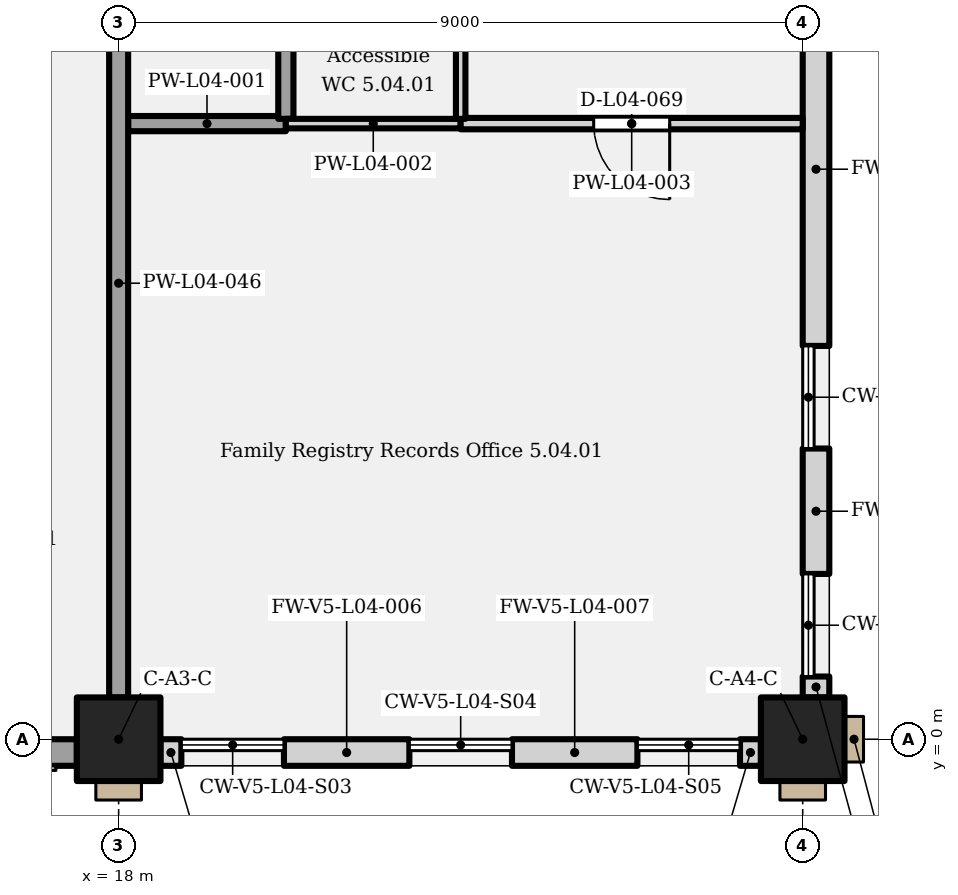
"""IFC4 building model, lengths in metres.
Left out: names, types, materials, properties, quantities, classifications, styles, units other than length and angle.
Written with IfcOpenShell. Run it as: python <this file> out.ifc"""

import sys

from ifc_helpers import new_model, si_unit, direction, frame, frame_2d, origin, origin_2d, place, context, subcontext, project, spatial, rectangle, extrude, element, fill, save


model = new_model("IFC4")
c1 = context("Model", 3, precision=1e-05, world=origin(), true_north=direction((0.0, 1.0)))
c2 = subcontext(c1, "Body", "Model", "MODEL_VIEW")
j1 = project(units=[si_unit("LENGTHUNIT", "METRE"), si_unit("PLANEANGLEUNIT", "RADIAN")], contexts=[c1])
p1 = place(None, origin())
s1 = spatial("IfcSite", under=j1, at=p1, CompositionType="ELEMENT")
p2 = place(p1, origin())
s2 = spatial("IfcBuilding", under=s1, at=p2, CompositionType="ELEMENT")
p3 = place(p2, frame((0.0, 0.0, 22.8)))
s3 = spatial("IfcBuildingStorey", under=s2, at=p3, CompositionType="ELEMENT", Elevation=22.8)
for number, where, z_axis, x_axis in (
    (1, (18.0, 0.0, 0.0), (0.0, 0.0, 1.0), (1.0, 0.0, 0.0)),
    (2, (27.0, 0.0, 0.0), (0.0, 0.0, 1.0), (1.0, 0.0, 0.0)),
):
    element("IfcColumn", number, at=place(p3, frame(where, z_axis=z_axis, x_axis=x_axis)), inside=s3, PredefinedType="COLUMN", context=c2, shape_type="SweptSolid", body=[
        extrude(rectangle(XDim=1.1, YDim=1.1, at=origin_2d()), origin(), (0.0, 0.0, 1.0), 5.4),
    ])
p4 = place(p3, frame((9.55, -0.175, 0.0), z_axis=(0.0, 0.0, 1.0), x_axis=(1.0, 0.0, 0.0)))
e3 = element("IfcWall", 3, at=p4, inside=s3, PredefinedType="SOLIDWALL", context=c2, shape_type="SweptSolid", body=[
    extrude(rectangle(XDim=7.9, YDim=0.35, at=frame_2d((3.95, 0.0))), origin(), (0.0, 0.0, 1.0), 5.15),
])
p5 = place(p3, frame((18.55, -0.175, 0.0), z_axis=(0.0, 0.0, 1.0), x_axis=(1.0, 0.0, 0.0)))
e4 = element("IfcWall", 4, at=p5, inside=s3, PredefinedType="SOLIDWALL", context=c2, shape_type="SweptSolid", body=[
    extrude(rectangle(XDim=0.275, YDim=0.35, at=frame_2d((0.137, 0.0))), origin(), (0.0, 0.0, 1.0), 5.15),
])
for number, where, z_axis, x_axis in (
    (5, (20.175, -0.175, 0.0), (0.0, 0.0, 1.0), (1.0, 0.0, 0.0)),
    (6, (23.175, -0.175, 0.0), (0.0, 0.0, 1.0), (1.0, 0.0, 0.0)),
):
    element("IfcWall", number, at=place(p3, frame(where, z_axis=z_axis, x_axis=x_axis)), inside=s3, PredefinedType="SOLIDWALL", context=c2, shape_type="SweptSolid", body=[
        extrude(rectangle(XDim=1.65, YDim=0.35, at=frame_2d((0.825, 0.0))), origin(), (0.0, 0.0, 1.0), 5.15),
    ])
for number, where, z_axis, x_axis in (
    (7, (26.175, -0.175, 0.0), (0.0, 0.0, 1.0), (1.0, 0.0, 0.0)),
    (8, (27.175, 0.55, 0.0), (0.0, 0.0, 1.0), (0.0, 1.0, 0.0)),
):
    element("IfcWall", number, at=place(p3, frame(where, z_axis=z_axis, x_axis=x_axis)), inside=s3, PredefinedType="SOLIDWALL", context=c2, shape_type="SweptSolid", body=[
        extrude(rectangle(XDim=0.275, YDim=0.35, at=frame_2d((0.137, 0.0))), origin(), (0.0, 0.0, 1.0), 5.15),
    ])
p6 = place(p3, frame((27.175, 2.175, 0.0), z_axis=(0.0, 0.0, 1.0), x_axis=(0.0, 1.0, 0.0)))
e9 = element("IfcWall", 9, at=p6, inside=s3, PredefinedType="SOLIDWALL", context=c2, shape_type="SweptSolid", body=[
    extrude(rectangle(XDim=1.65, YDim=0.35, at=frame_2d((0.825, 0.0))), origin(), (0.0, 0.0, 1.0), 5.15),
])
p7 = place(p3, frame((27.175, 5.175, 0.0), z_axis=(0.0, 0.0, 1.0), x_axis=(0.0, 1.0, 0.0)))
e10 = element("IfcWall", 10, at=p7, inside=s3, PredefinedType="SOLIDWALL", context=c2, shape_type="SweptSolid", body=[
    extrude(rectangle(XDim=4.65, YDim=0.35, at=frame_2d((2.325, 0.0))), origin(), (0.0, 0.0, 1.0), 5.15),
])
p8 = place(p3, frame((18.125, 8.1, 0.0), z_axis=(0.0, 0.0, 1.0), x_axis=(1.0, 0.0, 0.0)))
e11 = element("IfcWall", 11, at=p8, inside=s3, PredefinedType="PARTITIONING", context=c2, shape_type="SweptSolid", body=[
    extrude(rectangle(XDim=2.075, YDim=0.2, at=frame_2d((1.038, 0.0))), origin(), (0.0, 0.0, 1.0), 5.15),
])
p9 = place(p3, frame((20.2, 8.1, 0.0), z_axis=(0.0, 0.0, 1.0), x_axis=(1.0, 0.0, 0.0)))
e12 = element("IfcWall", 12, at=p9, inside=s3, PredefinedType="PARTITIONING", context=c2, shape_type="SweptSolid", body=[
    extrude(rectangle(XDim=2.3, YDim=0.125, at=frame_2d((1.15, 0.0))), origin(), (0.0, 0.0, 1.0), 5.15),
])
p10 = place(p3, frame((22.5, 8.1, 0.0), z_axis=(0.0, 0.0, 1.0), x_axis=(1.0, 0.0, 0.0)))
e13 = element("IfcWall", 13, at=p10, inside=s3, PredefinedType="PARTITIONING", context=c2, shape_type="SweptSolid", body=[
    extrude(rectangle(XDim=4.5, YDim=0.15, at=frame_2d((2.25, 0.0))), origin(), (0.0, 0.0, 1.0), 5.15),
])
p11 = place(p10, frame((2.75, 0.0, 0.0), z_axis=(0.0, 0.0, 1.0), x_axis=(-1.0, 0.0, 0.0)))
e14 = element("IfcOpeningElement", 14, at=p11, cuts=e13, PredefinedType="OPENING", context=c2, shape_type="SweptSolid", body=[
    extrude(rectangle(XDim=1.0, YDim=2.1, at=frame_2d((0.5, 1.05))), frame((0.0, 0.085, 0.0), z_axis=(0.0, -1.0, 0.0), x_axis=(1.0, 0.0, 0.0)), (0.0, 0.0, 1.0), 0.17),
])
p12 = place(p3, frame((18.0, 0.55, 0.0), z_axis=(0.0, 0.0, 1.0), x_axis=(0.0, 1.0, 0.0)))
e15 = element("IfcWall", 15, at=p12, inside=s3, PredefinedType="PARTITIONING", context=c2, shape_type="SweptSolid", body=[
    extrude(rectangle(XDim=10.9, YDim=0.25, at=frame_2d((5.45, 0.0))), origin(), (0.0, 0.0, 1.0), 4.4),
])
p13 = place(p3, frame((20.2, 8.163, 0.0), z_axis=(0.0, 0.0, 1.0), x_axis=(0.0, 1.0, 0.0)))
e16 = element("IfcWall", 16, at=p13, inside=s3, PredefinedType="PARTITIONING", context=c2, shape_type="SweptSolid", body=[
    extrude(rectangle(XDim=8.837, YDim=0.2, at=frame_2d((4.419, 0.0))), origin(), (0.0, 0.0, 1.0), 5.15),
])
p14 = place(p13, frame((8.037, 0.0, 0.0), z_axis=(0.0, 0.0, 1.0), x_axis=(-1.0, 0.0, 0.0)))
e17 = element("IfcOpeningElement", 17, at=p14, cuts=e16, PredefinedType="OPENING", context=c2, shape_type="SweptSolid", body=[
    extrude(rectangle(XDim=0.9, YDim=2.1, at=frame_2d((0.45, 1.05))), frame((0.0, 0.11, 0.0), z_axis=(0.0, -1.0, 0.0), x_axis=(1.0, 0.0, 0.0)), (0.0, 0.0, 1.0), 0.22),
])
p15 = place(p13, frame((5.337, 0.0, 0.0), z_axis=(0.0, 0.0, 1.0), x_axis=(-1.0, 0.0, 0.0)))
e18 = element("IfcOpeningElement", 18, at=p15, cuts=e16, PredefinedType="OPENING", context=c2, shape_type="SweptSolid", body=[
    extrude(rectangle(XDim=0.9, YDim=2.1, at=frame_2d((0.45, 1.05))), frame((0.0, 0.11, 0.0), z_axis=(0.0, -1.0, 0.0), x_axis=(1.0, 0.0, 0.0)), (0.0, 0.0, 1.0), 0.22),
])
p16 = place(p13, frame((2.238, 0.0, 0.0), z_axis=(0.0, 0.0, 1.0), x_axis=(-1.0, 0.0, 0.0)))
e19 = element("IfcOpeningElement", 19, at=p16, cuts=e16, PredefinedType="OPENING", context=c2, shape_type="SweptSolid", body=[
    extrude(rectangle(XDim=1.0, YDim=2.1, at=frame_2d((0.5, 1.05))), frame((0.0, 0.11, 0.0), z_axis=(0.0, -1.0, 0.0), x_axis=(1.0, 0.0, 0.0)), (0.0, 0.0, 1.0), 0.22),
])
p17 = place(p3, frame((22.5, 8.163, 0.0), z_axis=(0.0, 0.0, 1.0), x_axis=(0.0, 1.0, 0.0)))
e20 = element("IfcWall", 20, at=p17, inside=s3, PredefinedType="PARTITIONING", context=c2, shape_type="SweptSolid", body=[
    extrude(rectangle(XDim=8.837, YDim=0.125, at=frame_2d((4.419, 0.0))), origin(), (0.0, 0.0, 1.0), 5.15),
])
p18 = place(p11, origin())
e21 = element("IfcDoor", 21, at=p18, inside=s3, OperationType="SINGLE_SWING_LEFT", PredefinedType="DOOR", context=c2, shape_type="SweptSolid", body=[
    extrude(rectangle(XDim=1.0, YDim=2.1, at=frame_2d((0.5, 1.05))), frame((0.0, 0.025, 0.0), z_axis=(0.0, -1.0, 0.0), x_axis=(1.0, 0.0, 0.0)), (0.0, 0.0, 1.0), 0.05),
])
fill(e14, e21)
save(model, sys.argv[1])
